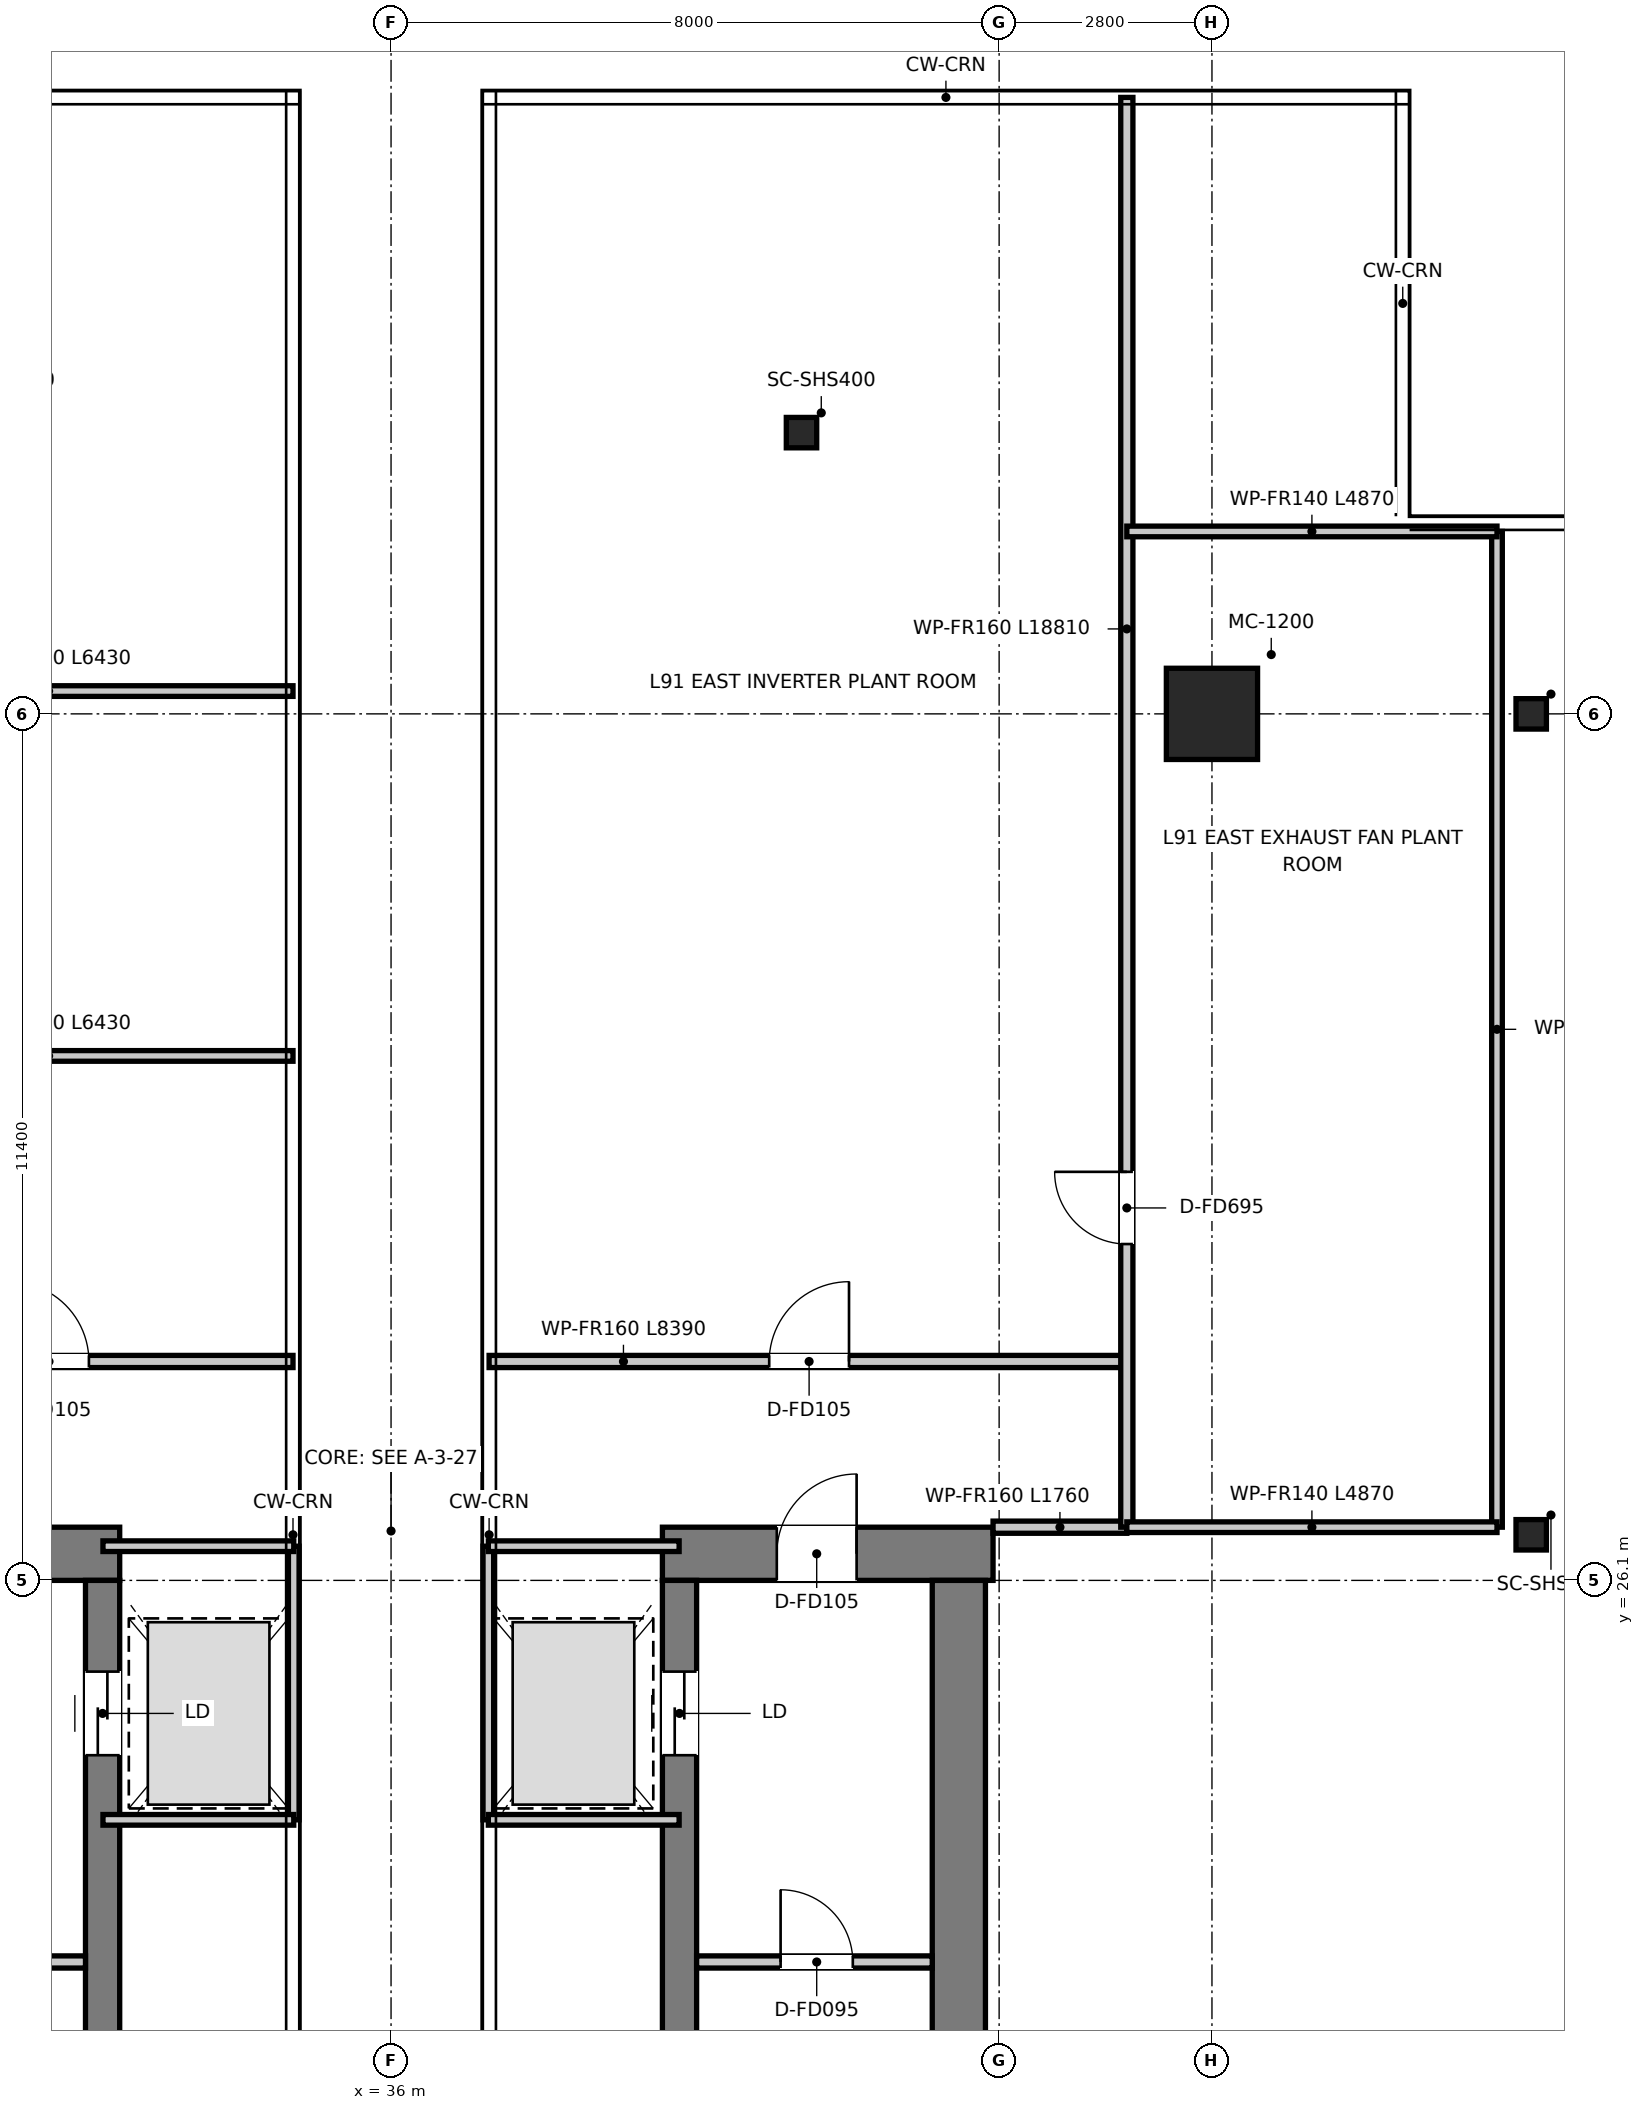
"""IFC4 building model, lengths in metres.
Left out: names, types, materials, properties, quantities, classifications, styles, units other than length and angle.
Written with IfcOpenShell. Run it as: python <this file> out.ifc"""

import sys

from ifc_helpers import new_model, si_unit, direction, frame, frame_2d, origin, origin_2d, place, context, subcontext, project, spatial, rectangle, hollow_rectangle, extrude, source, transform, mapped, element, fill, save


model = new_model("IFC4")
c1 = context("Model", 3, precision=1e-05, world=origin(), true_north=direction((0.0, 1.0)))
c2 = subcontext(c1, "Body", "Model", "MODEL_VIEW")
j1 = project(units=[si_unit("LENGTHUNIT", "METRE"), si_unit("PLANEANGLEUNIT", "RADIAN")], contexts=[c1])
p1 = place(None, origin())
s1 = spatial("IfcSite", under=j1, at=p1, CompositionType="ELEMENT")
p2 = place(p1, origin())
s2 = spatial("IfcBuilding", under=s1, at=p2, CompositionType="ELEMENT")
p3 = place(p2, frame((0.0, 0.0, 370.85)))
s3 = spatial("IfcBuildingStorey", under=s2, at=p3, CompositionType="ELEMENT", Elevation=370.85)
p4 = place(p3, frame((28.08, 26.45, 0.0), z_axis=(0.0, 0.0, 1.0), x_axis=(1.0, 0.0, 0.0)))
e1 = element("IfcWall", 1, at=p4, inside=s3, PredefinedType="SHEAR", context=c2, shape_type="SweptSolid", body=[
    extrude(rectangle(XDim=4.35, YDim=0.7, at=frame_2d((2.175, 0.0))), origin(), (0.0, 0.0, 1.0), 3.8),
])
p5 = place(p4, frame((1.795, 0.0, 0.0)))
e2 = element("IfcOpeningElement", 2, at=p5, cuts=e1, PredefinedType="OPENING", context=c2, shape_type="SweptSolid", body=[
    extrude(rectangle(XDim=1.05, YDim=2.1, at=frame_2d((0.525, 1.05))), frame((0.0, 0.36, 0.0), z_axis=(0.0, -1.0, 0.0), x_axis=(1.0, 0.0, 0.0)), (0.0, 0.0, 1.0), 0.72),
])
p6 = place(p3, frame((32.205, 13.22, 0.0), z_axis=(0.0, 0.0, 1.0), x_axis=(0.0, 1.0, 0.0)))
e3 = element("IfcWall", 3, at=p6, inside=s3, PredefinedType="SHEAR", context=c2, shape_type="SweptSolid", body=[
    extrude(rectangle(XDim=12.88, YDim=0.45, at=frame_2d((6.44, 0.0))), origin(), (0.0, 0.0, 1.0), 3.8),
])
p7 = place(p6, frame((10.58, 0.0, 0.0)))
e4 = element("IfcOpeningElement", 4, at=p7, cuts=e3, PredefinedType="OPENING", context=c2, shape_type="SweptSolid", body=[
    extrude(rectangle(XDim=1.1, YDim=2.15, at=frame_2d((0.55, 1.075))), frame((0.0, 0.235, 0.0), z_axis=(0.0, -1.0, 0.0), x_axis=(1.0, 0.0, 0.0)), (0.0, 0.0, 1.0), 0.47),
])
p8 = place(p3, frame((39.57, 26.45, 0.0), z_axis=(0.0, 0.0, 1.0), x_axis=(1.0, 0.0, 0.0)))
e5 = element("IfcWall", 5, at=p8, inside=s3, PredefinedType="SHEAR", context=c2, shape_type="SweptSolid", body=[
    extrude(rectangle(XDim=4.35, YDim=0.7, at=frame_2d((2.175, 0.0))), origin(), (0.0, 0.0, 1.0), 3.8),
])
p9 = place(p8, frame((1.505, 0.0, 0.0)))
e6 = element("IfcOpeningElement", 6, at=p9, cuts=e5, PredefinedType="OPENING", context=c2, shape_type="SweptSolid", body=[
    extrude(rectangle(XDim=1.05, YDim=2.1, at=frame_2d((0.525, 1.05))), frame((0.0, 0.36, 0.0), z_axis=(0.0, -1.0, 0.0), x_axis=(1.0, 0.0, 0.0)), (0.0, 0.0, 1.0), 0.72),
])
p10 = place(p3, frame((39.795, 13.22, 0.0), z_axis=(0.0, 0.0, 1.0), x_axis=(0.0, 1.0, 0.0)))
e7 = element("IfcWall", 7, at=p10, inside=s3, PredefinedType="SHEAR", context=c2, shape_type="SweptSolid", body=[
    extrude(rectangle(XDim=12.88, YDim=0.45, at=frame_2d((6.44, 0.0))), origin(), (0.0, 0.0, 1.0), 3.8),
])
p11 = place(p10, frame((10.58, 0.0, 0.0)))
e8 = element("IfcOpeningElement", 8, at=p11, cuts=e7, PredefinedType="OPENING", context=c2, shape_type="SweptSolid", body=[
    extrude(rectangle(XDim=1.1, YDim=2.15, at=frame_2d((0.55, 1.075))), frame((0.0, 0.235, 0.0), z_axis=(0.0, -1.0, 0.0), x_axis=(1.0, 0.0, 0.0)), (0.0, 0.0, 1.0), 0.47),
])
p12 = place(p3, frame((43.47, 11.2, 0.0), z_axis=(0.0, 0.0, 1.0), x_axis=(0.0, 1.0, 0.0)))
e9 = element("IfcWall", 9, at=p12, inside=s3, PredefinedType="SHEAR", context=c2, shape_type="SweptSolid", body=[
    extrude(rectangle(XDim=14.9, YDim=0.7, at=frame_2d((7.45, 0.0))), origin(), (0.0, 0.0, 1.0), 3.8),
])
m1 = source(origin(), c2, "Body", "SweptSolid", [
    extrude(rectangle(XDim=1.2, YDim=1.2, at=origin_2d()), origin(), (0.0, 0.0, 1.0), 3.8),
])
p13 = place(p3, frame((46.8, 37.5, 0.0), z_axis=(0.0, 0.0, 1.0), x_axis=(1.0, 0.0, 0.0)))
e10 = element("IfcColumn", 10, at=p13, inside=s3, PredefinedType="USERDEFINED", context=c2, shape_type="MappedRepresentation", body=[
    mapped(m1, transform((0.0, 0.0, 0.0), x_axis=(1.0, 0.0, 0.0), y_axis=(0.0, 1.0, 0.0), z_axis=(0.0, 0.0, 1.0), scale=1.0)),
])
m2 = source(origin(), c2, "Body", "SweptSolid", [
    extrude(hollow_rectangle(XDim=0.4, YDim=0.4, WallThickness=0.025, at=origin_2d()), origin(), (0.0, 0.0, 1.0), 3.8),
])
for number, where, z_axis, x_axis in (
    (11, (51.0, 26.7, 0.0), (0.0, 0.0, 1.0), (1.0, 0.0, 0.0)),
    (12, (51.0, 37.5, 0.0), (0.0, 0.0, 1.0), (1.0, 0.0, 0.0)),
    (13, (41.4, 41.2, 0.0), (0.0, 0.0, 1.0), (1.0, 0.0, 0.0)),
):
    element("IfcColumn", number, at=place(p3, frame(where, z_axis=z_axis, x_axis=x_axis)), inside=s3, PredefinedType="COLUMN", context=c2, shape_type="MappedRepresentation", body=[
        mapped(m2, transform((0.0, 0.0, 0.0), x_axis=(1.0, 0.0, 0.0), y_axis=(0.0, 1.0, 0.0), z_axis=(0.0, 0.0, 1.0), scale=1.0)),
    ])
p14 = place(p3, frame((28.88, 21.08, 0.0), z_axis=(0.0, 0.0, 1.0), x_axis=(1.0, 0.0, 0.0)))
e14 = element("IfcWall", 14, at=p14, inside=s3, PredefinedType="PARTITIONING", context=c2, shape_type="SweptSolid", body=[
    extrude(rectangle(XDim=3.1, YDim=0.16, at=frame_2d((1.55, 0.0))), origin(), (0.0, 0.0, 1.0), 3.5),
])
p15 = place(p14, frame((1.045, 0.0, 0.0)))
e15 = element("IfcOpeningElement", 15, at=p15, cuts=e14, PredefinedType="OPENING", context=c2, shape_type="SweptSolid", body=[
    extrude(rectangle(XDim=0.95, YDim=2.1, at=frame_2d((0.475, 1.05))), frame((0.0, 0.09, 0.0), z_axis=(0.0, -1.0, 0.0), x_axis=(1.0, 0.0, 0.0)), (0.0, 0.0, 1.0), 0.18),
])
p16 = place(p3, frame((34.72, 22.95, 0.0), z_axis=(0.0, 0.0, 1.0), x_axis=(0.0, 1.0, 0.0)))
e16 = element("IfcWall", 16, at=p16, inside=s3, PredefinedType="PARTITIONING", context=c2, shape_type="SweptSolid", body=[
    extrude(rectangle(XDim=3.6, YDim=0.14, at=frame_2d((1.8, 0.0))), origin(), (0.0, 0.0, 1.0), 3.5),
])
for number, where, z_axis, x_axis in (
    (17, (32.21, 22.95, 0.0), (0.0, 0.0, 1.0), (1.0, 0.0, 0.0)),
    (18, (32.21, 26.55, 0.0), (0.0, 0.0, 1.0), (1.0, 0.0, 0.0)),
):
    element("IfcWall", number, at=place(p3, frame(where, z_axis=z_axis, x_axis=x_axis)), inside=s3, PredefinedType="PARTITIONING", context=c2, shape_type="SweptSolid", body=[
        extrude(rectangle(XDim=2.51, YDim=0.14, at=frame_2d((1.255, 0.0))), origin(), (0.0, 0.0, 1.0), 3.5),
    ])
p17 = place(p3, frame((40.02, 21.08, 0.0), z_axis=(0.0, 0.0, 1.0), x_axis=(1.0, 0.0, 0.0)))
e19 = element("IfcWall", 19, at=p17, inside=s3, PredefinedType="PARTITIONING", context=c2, shape_type="SweptSolid", body=[
    extrude(rectangle(XDim=3.1, YDim=0.16, at=frame_2d((1.55, 0.0))), origin(), (0.0, 0.0, 1.0), 3.5),
])
p18 = place(p17, frame((1.105, 0.0, 0.0)))
e20 = element("IfcOpeningElement", 20, at=p18, cuts=e19, PredefinedType="OPENING", context=c2, shape_type="SweptSolid", body=[
    extrude(rectangle(XDim=0.95, YDim=2.1, at=frame_2d((0.475, 1.05))), frame((0.0, 0.09, 0.0), z_axis=(0.0, -1.0, 0.0), x_axis=(1.0, 0.0, 0.0)), (0.0, 0.0, 1.0), 0.18),
])
p19 = place(p3, frame((37.28, 22.95, 0.0), z_axis=(0.0, 0.0, 1.0), x_axis=(0.0, 1.0, 0.0)))
e21 = element("IfcWall", 21, at=p19, inside=s3, PredefinedType="PARTITIONING", context=c2, shape_type="SweptSolid", body=[
    extrude(rectangle(XDim=3.6, YDim=0.14, at=frame_2d((1.8, 0.0))), origin(), (0.0, 0.0, 1.0), 3.5),
])
for number, where, z_axis, x_axis in (
    (22, (37.28, 22.95, 0.0), (0.0, 0.0, 1.0), (1.0, 0.0, 0.0)),
    (23, (37.28, 26.55, 0.0), (0.0, 0.0, 1.0), (1.0, 0.0, 0.0)),
):
    element("IfcWall", number, at=place(p3, frame(where, z_axis=z_axis, x_axis=x_axis)), inside=s3, PredefinedType="PARTITIONING", context=c2, shape_type="SweptSolid", body=[
        extrude(rectangle(XDim=2.51, YDim=0.14, at=frame_2d((1.255, 0.0))), origin(), (0.0, 0.0, 1.0), 3.5),
    ])
p20 = place(p3, frame((28.28, 28.98, 0.0), z_axis=(0.0, 0.0, 1.0), x_axis=(1.0, 0.0, 0.0)))
e24 = element("IfcWall", 24, at=p20, inside=s3, PredefinedType="PARTITIONING", context=c2, shape_type="SweptSolid", body=[
    extrude(rectangle(XDim=6.43, YDim=0.16, at=frame_2d((3.215, 0.0))), origin(), (0.0, 0.0, 1.0), 3.01),
])
p21 = place(p20, frame((2.695, 0.0, 0.0)))
e25 = element("IfcOpeningElement", 25, at=p21, cuts=e24, PredefinedType="OPENING", context=c2, shape_type="SweptSolid", body=[
    extrude(rectangle(XDim=1.05, YDim=2.1, at=frame_2d((0.525, 1.05))), frame((0.0, 0.09, 0.0), z_axis=(0.0, -1.0, 0.0), x_axis=(1.0, 0.0, 0.0)), (0.0, 0.0, 1.0), 0.18),
])
for number, where, z_axis, x_axis in (
    (26, (28.28, 33.0, 0.0), (0.0, 0.0, 1.0), (1.0, 0.0, 0.0)),
    (27, (28.28, 37.8, 0.0), (0.0, 0.0, 1.0), (1.0, 0.0, 0.0)),
):
    element("IfcWall", number, at=place(p3, frame(where, z_axis=z_axis, x_axis=x_axis)), inside=s3, PredefinedType="PARTITIONING", context=c2, shape_type="SweptSolid", body=[
        extrude(rectangle(XDim=6.43, YDim=0.14, at=frame_2d((3.215, 0.0))), origin(), (0.0, 0.0, 1.0), 3.01),
    ])
p22 = place(p3, frame((37.29, 28.98, 0.0), z_axis=(0.0, 0.0, 1.0), x_axis=(1.0, 0.0, 0.0)))
e28 = element("IfcWall", 28, at=p22, inside=s3, PredefinedType="PARTITIONING", context=c2, shape_type="SweptSolid", body=[
    extrude(rectangle(XDim=8.39, YDim=0.16, at=frame_2d((4.195, 0.0))), origin(), (0.0, 0.0, 1.0), 3.01),
])
p23 = place(p22, frame((3.685, 0.0, 0.0)))
e29 = element("IfcOpeningElement", 29, at=p23, cuts=e28, PredefinedType="OPENING", context=c2, shape_type="SweptSolid", body=[
    extrude(rectangle(XDim=1.05, YDim=2.1, at=frame_2d((0.525, 1.05))), frame((0.0, 0.09, 0.0), z_axis=(0.0, -1.0, 0.0), x_axis=(1.0, 0.0, 0.0)), (0.0, 0.0, 1.0), 0.18),
])
p24 = place(p3, frame((43.92, 26.8, 0.0), z_axis=(0.0, 0.0, 1.0), x_axis=(1.0, 0.0, 0.0)))
e30 = element("IfcWall", 30, at=p24, inside=s3, PredefinedType="PARTITIONING", context=c2, shape_type="SweptSolid", body=[
    extrude(rectangle(XDim=1.76, YDim=0.16, at=frame_2d((0.88, 0.0))), origin(), (0.0, 0.0, 1.0), 3.5),
])
p25 = place(p3, frame((45.68, 26.8, 0.0), z_axis=(0.0, 0.0, 1.0), x_axis=(0.0, 1.0, 0.0)))
e31 = element("IfcWall", 31, at=p25, inside=s3, PredefinedType="PARTITIONING", context=c2, shape_type="SweptSolid", body=[
    extrude(rectangle(XDim=18.81, YDim=0.16, at=frame_2d((9.405, 0.0))), origin(), (0.0, 0.0, 1.0), 3.01),
])
p26 = place(p25, frame((3.725, 0.0, 0.0)))
e32 = element("IfcOpeningElement", 32, at=p26, cuts=e31, PredefinedType="OPENING", context=c2, shape_type="SweptSolid", body=[
    extrude(rectangle(XDim=0.95, YDim=2.1, at=frame_2d((0.475, 1.05))), frame((0.0, 0.09, 0.0), z_axis=(0.0, -1.0, 0.0), x_axis=(1.0, 0.0, 0.0)), (0.0, 0.0, 1.0), 0.18),
])
p27 = place(p3, frame((50.55, 26.8, 0.0), z_axis=(0.0, 0.0, 1.0), x_axis=(0.0, 1.0, 0.0)))
e33 = element("IfcWall", 33, at=p27, inside=s3, PredefinedType="PARTITIONING", context=c2, shape_type="SweptSolid", body=[
    extrude(rectangle(XDim=13.1, YDim=0.14, at=frame_2d((6.55, 0.0))), origin(), (0.0, 0.0, 1.0), 3.01),
])
p28 = place(p3, frame((45.68, 26.8, 0.0), z_axis=(0.0, 0.0, 1.0), x_axis=(1.0, 0.0, 0.0)))
e34 = element("IfcWall", 34, at=p28, inside=s3, PredefinedType="PARTITIONING", context=c2, shape_type="SweptSolid", body=[
    extrude(rectangle(XDim=4.87, YDim=0.14, at=frame_2d((2.435, 0.0))), origin(), (0.0, 0.0, 1.0), 3.01),
])
p29 = place(p3, frame((45.68, 39.9, 0.0), z_axis=(0.0, 0.0, 1.0), x_axis=(1.0, 0.0, 0.0)))
e35 = element("IfcWall", 35, at=p29, inside=s3, PredefinedType="PARTITIONING", context=c2, shape_type="SweptSolid", body=[
    extrude(rectangle(XDim=4.87, YDim=0.14, at=frame_2d((2.435, 0.0))), origin(), (0.0, 0.0, 1.0), 3.5),
])
p30 = place(p7, origin())
e36 = element("IfcDoor", 36, at=p30, inside=s3, OperationType="DOUBLE_DOOR_SLIDING", PredefinedType="DOOR", context=c2, shape_type="SweptSolid", body=[
    extrude(rectangle(XDim=1.1, YDim=2.15, at=frame_2d((0.55, 1.075))), frame((0.0, 0.025, 0.0), z_axis=(0.0, -1.0, 0.0), x_axis=(1.0, 0.0, 0.0)), (0.0, 0.0, 1.0), 0.05),
])
fill(e4, e36)
p31 = place(p18, origin())
e37 = element("IfcDoor", 37, at=p31, inside=s3, OperationType="SINGLE_SWING_LEFT", PredefinedType="DOOR", context=c2, shape_type="SweptSolid", body=[
    extrude(rectangle(XDim=0.95, YDim=2.1, at=frame_2d((0.475, 1.05))), frame((0.0, 0.025, 0.0), z_axis=(0.0, -1.0, 0.0), x_axis=(1.0, 0.0, 0.0)), (0.0, 0.0, 1.0), 0.05),
])
fill(e20, e37)
p32 = place(p11, origin())
e38 = element("IfcDoor", 38, at=p32, inside=s3, OperationType="DOUBLE_DOOR_SLIDING", PredefinedType="DOOR", context=c2, shape_type="SweptSolid", body=[
    extrude(rectangle(XDim=1.1, YDim=2.15, at=frame_2d((0.55, 1.075))), frame((0.0, 0.025, 0.0), z_axis=(0.0, -1.0, 0.0), x_axis=(1.0, 0.0, 0.0)), (0.0, 0.0, 1.0), 0.05),
])
fill(e8, e38)
p33 = place(p9, origin())
e39 = element("IfcDoor", 39, at=p33, inside=s3, OperationType="SINGLE_SWING_RIGHT", PredefinedType="DOOR", context=c2, shape_type="SweptSolid", body=[
    extrude(rectangle(XDim=1.05, YDim=2.1, at=frame_2d((0.525, 1.05))), frame((0.0, 0.025, 0.0), z_axis=(0.0, -1.0, 0.0), x_axis=(1.0, 0.0, 0.0)), (0.0, 0.0, 1.0), 0.05),
])
fill(e6, e39)
p34 = place(p21, origin())
e40 = element("IfcDoor", 40, at=p34, inside=s3, OperationType="SINGLE_SWING_LEFT", PredefinedType="DOOR", context=c2, shape_type="SweptSolid", body=[
    extrude(rectangle(XDim=1.05, YDim=2.1, at=frame_2d((0.525, 1.05))), frame((0.0, 0.025, 0.0), z_axis=(0.0, -1.0, 0.0), x_axis=(1.0, 0.0, 0.0)), (0.0, 0.0, 1.0), 0.05),
])
fill(e25, e40)
p35 = place(p23, origin())
e41 = element("IfcDoor", 41, at=p35, inside=s3, OperationType="SINGLE_SWING_RIGHT", PredefinedType="DOOR", context=c2, shape_type="SweptSolid", body=[
    extrude(rectangle(XDim=1.05, YDim=2.1, at=frame_2d((0.525, 1.05))), frame((0.0, 0.025, 0.0), z_axis=(0.0, -1.0, 0.0), x_axis=(1.0, 0.0, 0.0)), (0.0, 0.0, 1.0), 0.05),
])
fill(e29, e41)
p36 = place(p26, origin())
e42 = element("IfcDoor", 42, at=p36, inside=s3, OperationType="SINGLE_SWING_RIGHT", PredefinedType="DOOR", context=c2, shape_type="SweptSolid", body=[
    extrude(rectangle(XDim=0.95, YDim=2.1, at=frame_2d((0.475, 1.05))), frame((0.0, 0.025, 0.0), z_axis=(0.0, -1.0, 0.0), x_axis=(1.0, 0.0, 0.0)), (0.0, 0.0, 1.0), 0.05),
])
fill(e32, e42)
save(model, sys.argv[1])
